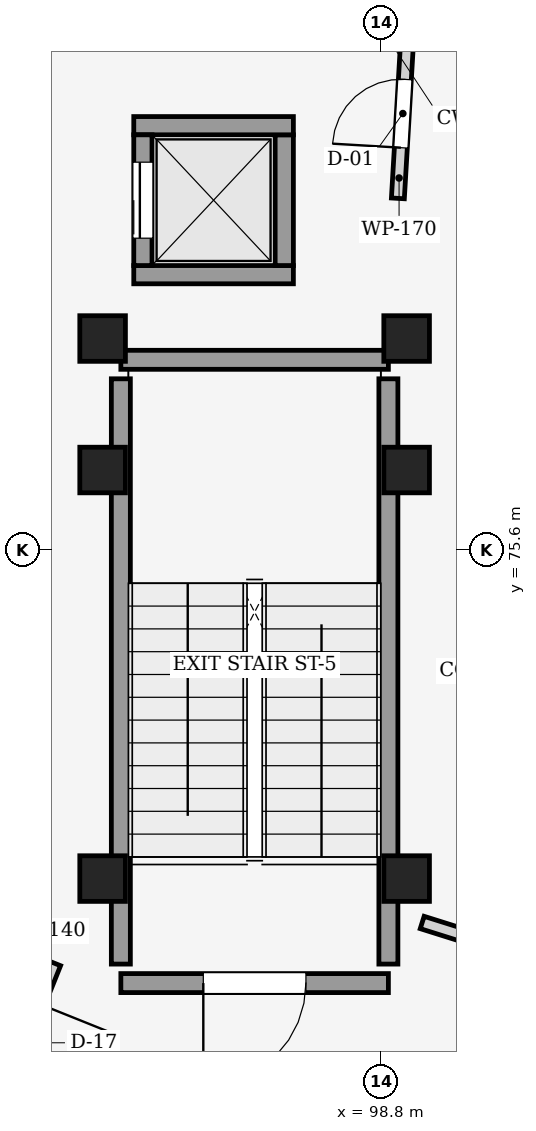
"""IFC4 building model, lengths in metres.
Left out: names, types, materials, properties, quantities, classifications, styles, units other than length and angle.
Written with IfcOpenShell. Run it as: python <this file> out.ifc"""

import sys

from ifc_helpers import new_model, si_unit, direction, frame, frame_2d, origin, origin_2d, place, context, subcontext, project, spatial, rectangle, extrude, element, fill, save


model = new_model("IFC4")
c1 = context("Model", 3, precision=1e-05, world=origin(), true_north=direction((0.0, 1.0)))
c2 = subcontext(c1, "Body", "Model", "MODEL_VIEW")
j1 = project(units=[si_unit("LENGTHUNIT", "METRE"), si_unit("PLANEANGLEUNIT", "RADIAN")], contexts=[c1])
p1 = place(None, origin())
s1 = spatial("IfcSite", under=j1, at=p1, CompositionType="ELEMENT")
p2 = place(p1, origin())
s2 = spatial("IfcBuilding", under=s1, at=p2, CompositionType="ELEMENT")
p3 = place(p2, frame((0.0, 0.0, 9.15)))
s3 = spatial("IfcBuildingStorey", under=s2, at=p3, CompositionType="ELEMENT", Elevation=9.15)
for number, where, z_axis, x_axis in (
    (1, (99.14, 71.275, 0.0), (0.0, 0.0, 1.0), (1.0, 0.0, 0.0)),
    (2, (95.14, 71.275, 0.0), (0.0, 0.0, 1.0), (1.0, 0.0, 0.0)),
    (3, (99.14, 76.65, 0.0), (0.0, 0.0, 1.0), (1.0, 0.0, 0.0)),
    (4, (95.14, 76.65, 0.0), (0.0, 0.0, 1.0), (1.0, 0.0, 0.0)),
    (5, (99.14, 78.38, 0.0), (0.0, 0.0, 1.0), (1.0, 0.0, 0.0)),
    (6, (95.14, 78.38, 0.0), (0.0, 0.0, 1.0), (1.0, 0.0, 0.0)),
):
    element("IfcColumn", number, at=place(p3, frame(where, z_axis=z_axis, x_axis=x_axis)), inside=s3, PredefinedType="COLUMN", context=c2, shape_type="SweptSolid", body=[
        extrude(rectangle(XDim=0.6, YDim=0.6, at=origin_2d()), origin(), (0.0, 0.0, 1.0), 4.05),
    ])
p4 = place(p3, frame((98.9, 69.9, 0.0), z_axis=(0.0, 0.0, 1.0), x_axis=(-1.0, 0.0, 0.0)))
e7 = element("IfcWall", 7, at=p4, inside=s3, PredefinedType="SHEAR", context=c2, shape_type="SweptSolid", body=[
    extrude(rectangle(XDim=3.52, YDim=0.25, at=frame_2d((1.76, 0.0))), origin(), (0.0, 0.0, 1.0), 4.05),
])
p5 = place(p4, frame((1.085, 0.0, 0.0)))
e8 = element("IfcOpeningElement", 8, at=p5, cuts=e7, PredefinedType="OPENING", context=c2, shape_type="SweptSolid", body=[
    extrude(rectangle(XDim=1.35, YDim=2.2, at=frame_2d((0.675, 1.1))), frame((0.0, 0.135, 0.0), z_axis=(0.0, -1.0, 0.0), x_axis=(1.0, 0.0, 0.0)), (0.0, 0.0, 1.0), 0.27),
])
p6 = place(p3, frame((95.38, 70.15, 0.0), z_axis=(0.0, 0.0, 1.0), x_axis=(0.0, 1.0, 0.0)))
e9 = element("IfcWall", 9, at=p6, inside=s3, PredefinedType="SHEAR", context=c2, shape_type="SweptSolid", body=[
    extrude(rectangle(XDim=7.7, YDim=0.25, at=frame_2d((3.85, 0.0))), origin(), (0.0, 0.0, 1.0), 4.05),
])
p7 = place(p3, frame((95.38, 78.1, 0.0), z_axis=(0.0, 0.0, 1.0), x_axis=(1.0, 0.0, 0.0)))
e10 = element("IfcWall", 10, at=p7, inside=s3, PredefinedType="SHEAR", context=c2, shape_type="SweptSolid", body=[
    extrude(rectangle(XDim=3.52, YDim=0.25, at=frame_2d((1.76, 0.0))), origin(), (0.0, 0.0, 1.0), 4.05),
])
p8 = place(p3, frame((98.9, 77.85, 0.0), z_axis=(0.0, 0.0, 1.0), x_axis=(0.0, -1.0, 0.0)))
e11 = element("IfcWall", 11, at=p8, inside=s3, PredefinedType="SHEAR", context=c2, shape_type="SweptSolid", body=[
    extrude(rectangle(XDim=7.7, YDim=0.25, at=frame_2d((3.85, 0.0))), origin(), (0.0, 0.0, 1.0), 4.05),
])
p9 = place(p3, frame((97.65, 79.22, 0.0), z_axis=(0.0, 0.0, 1.0), x_axis=(-1.0, 0.0, 0.0)))
e12 = element("IfcWall", 12, at=p9, inside=s3, PredefinedType="SHEAR", context=c2, shape_type="SweptSolid", body=[
    extrude(rectangle(XDim=2.1, YDim=0.24, at=frame_2d((1.05, 0.0))), origin(), (0.0, 0.0, 1.0), 4.05),
])
p10 = place(p3, frame((97.53, 81.06, 0.0), z_axis=(0.0, 0.0, 1.0), x_axis=(0.0, -1.0, 0.0)))
e13 = element("IfcWall", 13, at=p10, inside=s3, PredefinedType="SHEAR", context=c2, shape_type="SweptSolid", body=[
    extrude(rectangle(XDim=1.72, YDim=0.24, at=frame_2d((0.86, 0.0))), origin(), (0.0, 0.0, 1.0), 4.05),
])
p11 = place(p3, frame((95.55, 81.18, 0.0), z_axis=(0.0, 0.0, 1.0), x_axis=(1.0, 0.0, 0.0)))
e14 = element("IfcWall", 14, at=p11, inside=s3, PredefinedType="SHEAR", context=c2, shape_type="SweptSolid", body=[
    extrude(rectangle(XDim=2.1, YDim=0.24, at=frame_2d((1.05, 0.0))), origin(), (0.0, 0.0, 1.0), 4.05),
])
p12 = place(p3, frame((95.67, 79.34, 0.0), z_axis=(0.0, 0.0, 1.0), x_axis=(0.0, 1.0, 0.0)))
e15 = element("IfcWall", 15, at=p12, inside=s3, PredefinedType="SHEAR", context=c2, shape_type="SweptSolid", body=[
    extrude(rectangle(XDim=1.72, YDim=0.24, at=frame_2d((0.86, 0.0))), origin(), (0.0, 0.0, 1.0), 4.05),
])
p13 = place(p12, frame((0.36, 0.0, 0.0)))
e16 = element("IfcOpeningElement", 16, at=p13, cuts=e15, PredefinedType="OPENING", context=c2, shape_type="SweptSolid", body=[
    extrude(rectangle(XDim=1.0, YDim=2.15, at=frame_2d((0.5, 1.075))), frame((0.0, 0.13, 0.0), z_axis=(0.0, -1.0, 0.0), x_axis=(1.0, 0.0, 0.0)), (0.0, 0.0, 1.0), 0.26),
])
p14 = place(p3, frame((99.025, 80.224, 0.0), z_axis=(0.0, 0.0, 1.0), x_axis=(0.058613248542, 0.998280765664, 0.0)))
e17 = element("IfcWall", 17, at=p14, inside=s3, PredefinedType="PARTITIONING", context=c2, shape_type="SweptSolid", body=[
    extrude(rectangle(XDim=2.237, YDim=0.17, at=frame_2d((1.118, 0.0))), origin(), (0.0, 0.0, 1.0), 3.7),
])
p15 = place(p14, frame((0.668, 0.0, 0.0)))
e18 = element("IfcOpeningElement", 18, at=p15, cuts=e17, PredefinedType="OPENING", context=c2, shape_type="SweptSolid", body=[
    extrude(rectangle(XDim=0.9, YDim=2.1, at=frame_2d((0.45, 1.05))), frame((0.0, 0.095, 0.0), z_axis=(0.0, -1.0, 0.0), x_axis=(1.0, 0.0, 0.0)), (0.0, 0.0, 1.0), 0.19),
])
p16 = place(p3, frame((103.998, 69.234, 0.0), z_axis=(0.0, 0.0, 1.0), x_axis=(-0.953940529117, 0.299995778149, 0.0)))
e19 = element("IfcWall", 19, at=p16, inside=s3, PredefinedType="PARTITIONING", context=c2, shape_type="SweptSolid", body=[
    extrude(rectangle(XDim=4.878, YDim=0.17, at=frame_2d((2.439, 0.0))), origin(), (0.0, 0.0, 1.0), 3.165),
])
p17 = place(p3, frame((94.522, 70.155, 0.0), z_axis=(0.0, 0.0, 1.0), x_axis=(-0.372385151869, -0.928078282618, 0.0)))
e20 = element("IfcWall", 20, at=p17, inside=s3, PredefinedType="PARTITIONING", context=c2, shape_type="SweptSolid", body=[
    extrude(rectangle(XDim=2.243, YDim=0.14, at=frame_2d((1.122, 0.0))), origin(), (0.0, 0.0, 1.0), 3.7),
])
p18 = place(p17, frame((0.571, 0.0, 0.0)))
e21 = element("IfcOpeningElement", 21, at=p18, cuts=e20, PredefinedType="OPENING", context=c2, shape_type="SweptSolid", body=[
    extrude(rectangle(XDim=1.1, YDim=2.35, at=frame_2d((0.55, 1.175))), frame((0.0, 0.08, 0.0), z_axis=(0.0, -1.0, 0.0), x_axis=(1.0, 0.0, 0.0)), (0.0, 0.0, 1.0), 0.16),
])
p19 = place(p5, origin())
e22 = element("IfcDoor", 22, at=p19, inside=s3, OperationType="SINGLE_SWING_RIGHT", PredefinedType="DOOR", context=c2, shape_type="SweptSolid", body=[
    extrude(rectangle(XDim=1.35, YDim=2.2, at=frame_2d((0.675, 1.1))), frame((0.0, 0.025, 0.0), z_axis=(0.0, -1.0, 0.0), x_axis=(1.0, 0.0, 0.0)), (0.0, 0.0, 1.0), 0.05),
])
fill(e8, e22)
p20 = place(p13, origin())
e23 = element("IfcDoor", 23, at=p20, inside=s3, OperationType="SLIDING_TO_LEFT", PredefinedType="DOOR", context=c2, shape_type="SweptSolid", body=[
    extrude(rectangle(XDim=1.0, YDim=2.15, at=frame_2d((0.5, 1.075))), frame((0.0, 0.025, 0.0), z_axis=(0.0, -1.0, 0.0), x_axis=(1.0, 0.0, 0.0)), (0.0, 0.0, 1.0), 0.05),
])
fill(e16, e23)
p21 = place(p15, origin())
e24 = element("IfcDoor", 24, at=p21, inside=s3, OperationType="SINGLE_SWING_LEFT", PredefinedType="DOOR", context=c2, shape_type="SweptSolid", body=[
    extrude(rectangle(XDim=0.9, YDim=2.1, at=frame_2d((0.45, 1.05))), frame((0.0, 0.025, 0.0), z_axis=(0.0, -1.0, 0.0), x_axis=(1.0, 0.0, 0.0)), (0.0, 0.0, 1.0), 0.05),
])
fill(e18, e24)
save(model, sys.argv[1])
